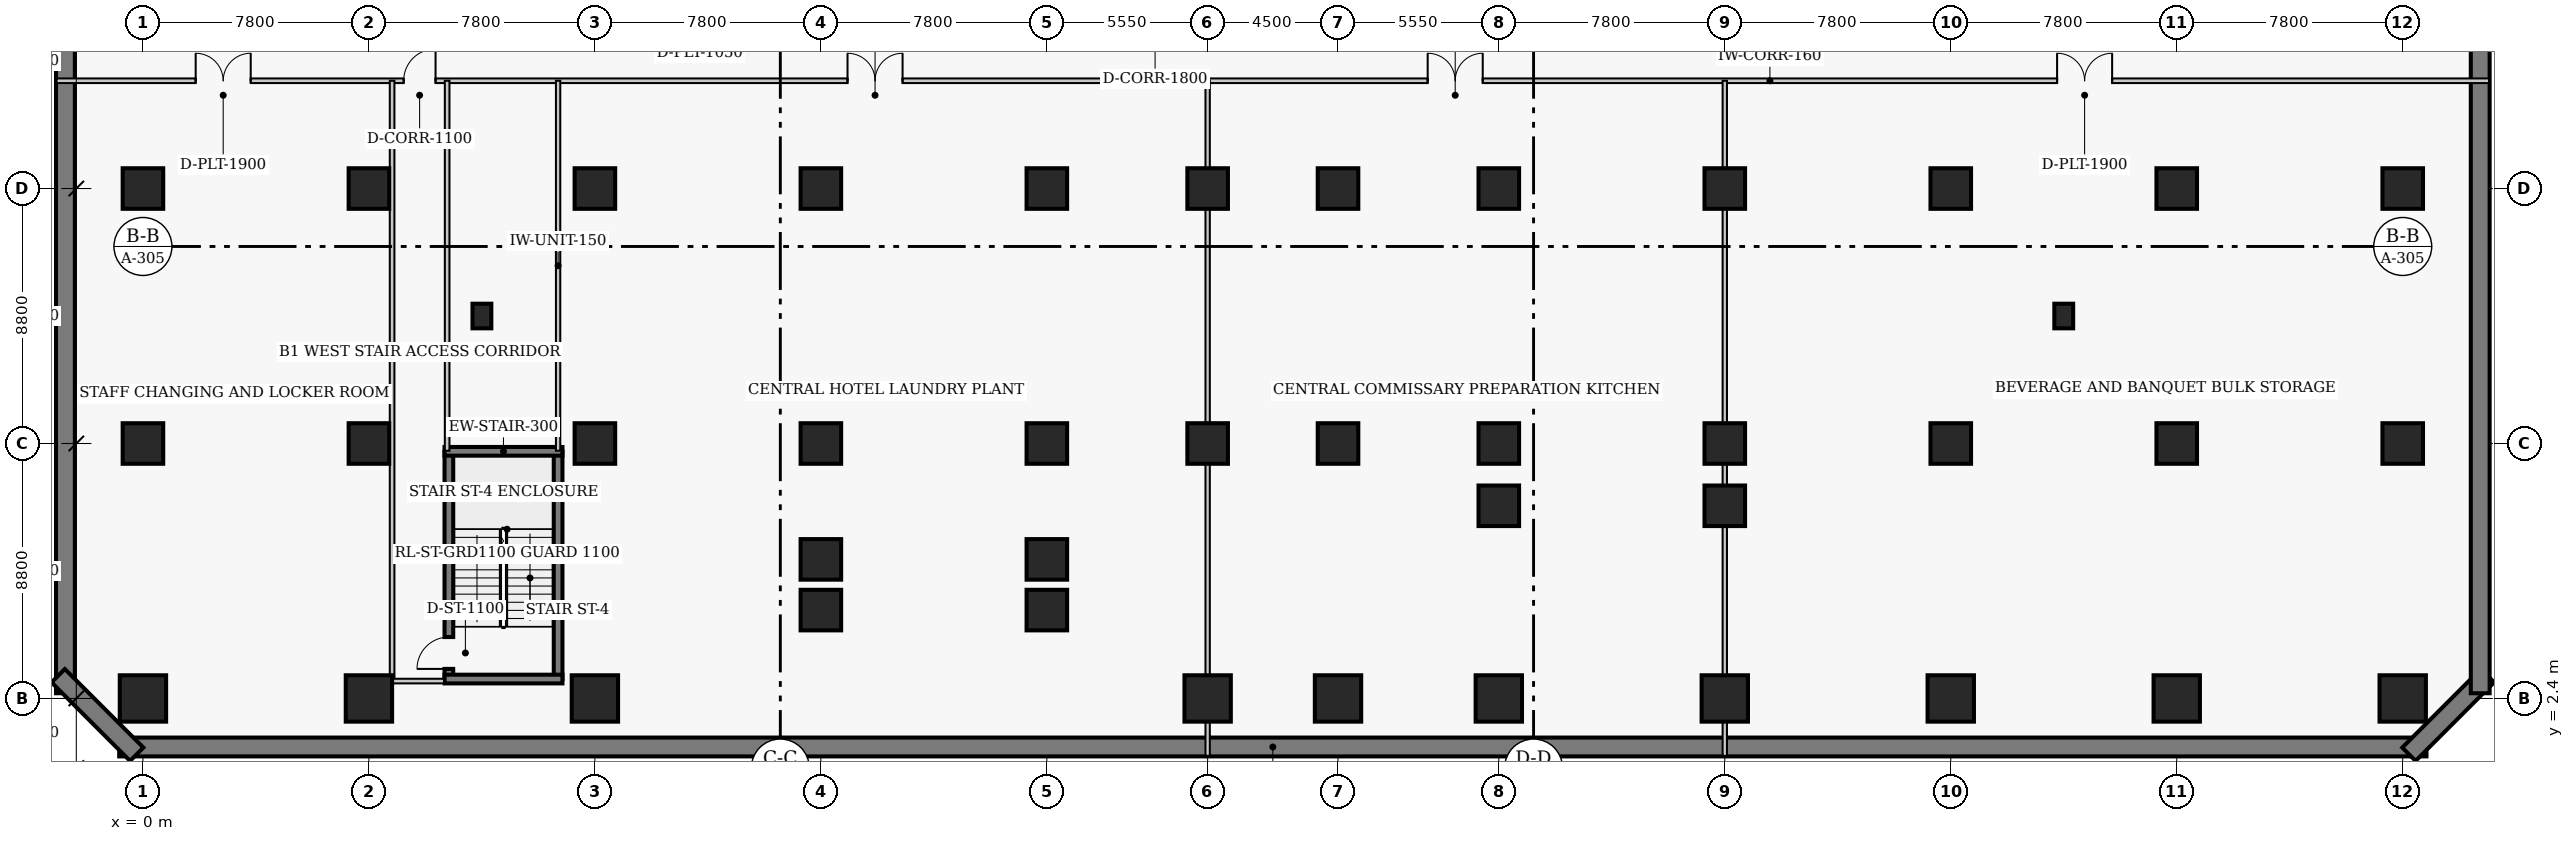
"""IFC4 building model, lengths in metres.
Left out: names, types, materials, properties, quantities, classifications, styles, units other than length and angle.
Written with IfcOpenShell. Run it as: python <this file> out.ifc"""

import sys

from ifc_helpers import new_model, si_unit, direction, frame, frame_2d, origin, origin_2d, place, context, subcontext, project, spatial, rectangle, extrude, element, fill, save


model = new_model("IFC4")
c1 = context("Model", 3, precision=1e-05, world=origin(), true_north=direction((0.0, 1.0)))
c2 = subcontext(c1, "Body", "Model", "MODEL_VIEW")
j1 = project(units=[si_unit("LENGTHUNIT", "METRE"), si_unit("PLANEANGLEUNIT", "RADIAN")], contexts=[c1])
p1 = place(None, origin())
s1 = spatial("IfcSite", under=j1, at=p1, CompositionType="ELEMENT")
p2 = place(p1, origin())
s2 = spatial("IfcBuilding", under=s1, at=p2, CompositionType="ELEMENT")
p3 = place(p2, frame((0.0, 0.0, -4.5)))
s3 = spatial("IfcBuildingStorey", under=s2, at=p3, CompositionType="ELEMENT", Elevation=-4.5)
p4 = place(p3, frame((-0.82, 0.725, 0.0), z_axis=(0.0, 0.0, 1.0), x_axis=(1.0, 0.0, 0.0)))
e1 = element("IfcWall", 1, at=p4, inside=s3, PredefinedType="USERDEFINED", context=c2, shape_type="SweptSolid", body=[
    extrude(rectangle(XDim=79.64, YDim=0.65, at=frame_2d((39.82, 0.0))), origin(), (0.0, 0.0, 1.0), 4.15),
])
p5 = place(p3, frame((78.215, 0.474, 0.0), z_axis=(0.0, 0.0, 1.0), x_axis=(0.707106781187, 0.707106781187, 0.0)))
e2 = element("IfcWall", 2, at=p5, inside=s3, PredefinedType="USERDEFINED", context=c2, shape_type="SweptSolid", body=[
    extrude(rectangle(XDim=3.834, YDim=0.65, at=frame_2d((1.917, 0.0))), origin(), (0.0, 0.0, 1.0), 4.15),
])
for number, where, z_axis, x_axis in (
    (3, (80.675, 2.58, 0.0), (0.0, 0.0, 1.0), (0.0, 1.0, 0.0)),
    (4, (-2.675, 49.42, 0.0), (0.0, 0.0, 1.0), (0.0, -1.0, 0.0)),
):
    element("IfcWall", number, at=place(p3, frame(where, z_axis=z_axis, x_axis=x_axis)), inside=s3, PredefinedType="USERDEFINED", context=c2, shape_type="SweptSolid", body=[
        extrude(rectangle(XDim=46.84, YDim=0.65, at=frame_2d((23.42, 0.0))), origin(), (0.0, 0.0, 1.0), 4.15),
    ])
p6 = place(p3, frame((-2.926, 3.185, 0.0), z_axis=(0.0, 0.0, 1.0), x_axis=(0.707106781187, -0.707106781187, 0.0)))
e5 = element("IfcWall", 5, at=p6, inside=s3, PredefinedType="USERDEFINED", context=c2, shape_type="SweptSolid", body=[
    extrude(rectangle(XDim=3.834, YDim=0.65, at=frame_2d((1.917, 0.0))), origin(), (0.0, 0.0, 1.0), 4.15),
])
p7 = place(p3, frame((10.56, 3.07, 0.0), z_axis=(0.0, 0.0, 1.0), x_axis=(0.0, 1.0, 0.0)))
e6 = element("IfcWall", 6, at=p7, inside=s3, PredefinedType="SHEAR", context=c2, shape_type="SweptSolid", body=[
    extrude(rectangle(XDim=7.86, YDim=0.3, at=frame_2d((3.93, 0.0))), origin(), (0.0, 0.0, 1.0), 4.5),
])
p8 = place(p7, frame((0.35, 0.0, 0.0)))
e7 = element("IfcOpeningElement", 7, at=p8, cuts=e6, PredefinedType="OPENING", context=c2, shape_type="SweptSolid", body=[
    extrude(rectangle(XDim=1.1, YDim=2.15, at=frame_2d((0.55, 1.075))), frame((0.0, 0.16, 0.0), z_axis=(0.0, -1.0, 0.0), x_axis=(1.0, 0.0, 0.0)), (0.0, 0.0, 1.0), 0.32),
])
p9 = place(p3, frame((14.33, 3.07, 0.0), z_axis=(0.0, 0.0, 1.0), x_axis=(0.0, 1.0, 0.0)))
e8 = element("IfcWall", 8, at=p9, inside=s3, PredefinedType="SHEAR", context=c2, shape_type="SweptSolid", body=[
    extrude(rectangle(XDim=7.86, YDim=0.3, at=frame_2d((3.93, 0.0))), origin(), (0.0, 0.0, 1.0), 4.5),
])
for number, where, z_axis, x_axis in (
    (9, (10.41, 10.93, 0.0), (0.0, 0.0, 1.0), (1.0, 0.0, 0.0)),
    (10, (10.41, 3.07, 0.0), (0.0, 0.0, 1.0), (1.0, 0.0, 0.0)),
):
    element("IfcWall", number, at=place(p3, frame(where, z_axis=z_axis, x_axis=x_axis)), inside=s3, PredefinedType="SHEAR", context=c2, shape_type="SweptSolid", body=[
        extrude(rectangle(XDim=4.07, YDim=0.3, at=frame_2d((2.035, 0.0))), origin(), (0.0, 0.0, 1.0), 4.5),
    ])
p10 = place(p3, frame((0.0, 2.4, 0.0), z_axis=(0.0, 0.0, 1.0), x_axis=(1.0, 0.0, 0.0)))
e11 = element("IfcColumn", 11, at=p10, inside=s3, PredefinedType="COLUMN", context=c2, shape_type="SweptSolid", body=[
    extrude(rectangle(XDim=1.6, YDim=1.6, at=origin_2d()), origin(), (0.0, 0.0, 1.0), 4.5),
])
for number, where, z_axis, x_axis in (
    (12, (0.0, 11.2, 0.0), (0.0, 0.0, 1.0), (1.0, 0.0, 0.0)),
    (13, (0.0, 20.0, 0.0), (0.0, 0.0, 1.0), (1.0, 0.0, 0.0)),
):
    element("IfcColumn", number, at=place(p3, frame(where, z_axis=z_axis, x_axis=x_axis)), inside=s3, PredefinedType="COLUMN", context=c2, shape_type="SweptSolid", body=[
        extrude(rectangle(XDim=1.4, YDim=1.4, at=origin_2d()), origin(), (0.0, 0.0, 1.0), 4.5),
    ])
p11 = place(p3, frame((7.8, 2.4, 0.0), z_axis=(0.0, 0.0, 1.0), x_axis=(1.0, 0.0, 0.0)))
e14 = element("IfcColumn", 14, at=p11, inside=s3, PredefinedType="COLUMN", context=c2, shape_type="SweptSolid", body=[
    extrude(rectangle(XDim=1.6, YDim=1.6, at=origin_2d()), origin(), (0.0, 0.0, 1.0), 4.5),
])
for number, where, z_axis, x_axis in (
    (15, (7.8, 11.2, 0.0), (0.0, 0.0, 1.0), (1.0, 0.0, 0.0)),
    (16, (7.8, 20.0, 0.0), (0.0, 0.0, 1.0), (1.0, 0.0, 0.0)),
):
    element("IfcColumn", number, at=place(p3, frame(where, z_axis=z_axis, x_axis=x_axis)), inside=s3, PredefinedType="COLUMN", context=c2, shape_type="SweptSolid", body=[
        extrude(rectangle(XDim=1.4, YDim=1.4, at=origin_2d()), origin(), (0.0, 0.0, 1.0), 4.5),
    ])
p12 = place(p3, frame((15.6, 2.4, 0.0), z_axis=(0.0, 0.0, 1.0), x_axis=(1.0, 0.0, 0.0)))
e17 = element("IfcColumn", 17, at=p12, inside=s3, PredefinedType="COLUMN", context=c2, shape_type="SweptSolid", body=[
    extrude(rectangle(XDim=1.6, YDim=1.6, at=origin_2d()), origin(), (0.0, 0.0, 1.0), 4.5),
])
for number, where, z_axis, x_axis in (
    (18, (15.6, 11.2, 0.0), (0.0, 0.0, 1.0), (1.0, 0.0, 0.0)),
    (19, (15.6, 20.0, 0.0), (0.0, 0.0, 1.0), (1.0, 0.0, 0.0)),
    (20, (23.4, 11.2, 0.0), (0.0, 0.0, 1.0), (1.0, 0.0, 0.0)),
    (21, (23.4, 20.0, 0.0), (0.0, 0.0, 1.0), (1.0, 0.0, 0.0)),
    (22, (31.2, 11.2, 0.0), (0.0, 0.0, 1.0), (1.0, 0.0, 0.0)),
    (23, (31.2, 20.0, 0.0), (0.0, 0.0, 1.0), (1.0, 0.0, 0.0)),
):
    element("IfcColumn", number, at=place(p3, frame(where, z_axis=z_axis, x_axis=x_axis)), inside=s3, PredefinedType="COLUMN", context=c2, shape_type="SweptSolid", body=[
        extrude(rectangle(XDim=1.4, YDim=1.4, at=origin_2d()), origin(), (0.0, 0.0, 1.0), 4.5),
    ])
p13 = place(p3, frame((36.75, 2.4, 0.0), z_axis=(0.0, 0.0, 1.0), x_axis=(1.0, 0.0, 0.0)))
e24 = element("IfcColumn", 24, at=p13, inside=s3, PredefinedType="COLUMN", context=c2, shape_type="SweptSolid", body=[
    extrude(rectangle(XDim=1.6, YDim=1.6, at=origin_2d()), origin(), (0.0, 0.0, 1.0), 4.5),
])
for number, where, z_axis, x_axis in (
    (25, (36.75, 11.2, 0.0), (0.0, 0.0, 1.0), (1.0, 0.0, 0.0)),
    (26, (36.75, 20.0, 0.0), (0.0, 0.0, 1.0), (1.0, 0.0, 0.0)),
):
    element("IfcColumn", number, at=place(p3, frame(where, z_axis=z_axis, x_axis=x_axis)), inside=s3, PredefinedType="COLUMN", context=c2, shape_type="SweptSolid", body=[
        extrude(rectangle(XDim=1.4, YDim=1.4, at=origin_2d()), origin(), (0.0, 0.0, 1.0), 4.5),
    ])
p14 = place(p3, frame((41.25, 2.4, 0.0), z_axis=(0.0, 0.0, 1.0), x_axis=(1.0, 0.0, 0.0)))
e27 = element("IfcColumn", 27, at=p14, inside=s3, PredefinedType="COLUMN", context=c2, shape_type="SweptSolid", body=[
    extrude(rectangle(XDim=1.6, YDim=1.6, at=origin_2d()), origin(), (0.0, 0.0, 1.0), 4.5),
])
for number, where, z_axis, x_axis in (
    (28, (41.25, 11.2, 0.0), (0.0, 0.0, 1.0), (1.0, 0.0, 0.0)),
    (29, (41.25, 20.0, 0.0), (0.0, 0.0, 1.0), (1.0, 0.0, 0.0)),
):
    element("IfcColumn", number, at=place(p3, frame(where, z_axis=z_axis, x_axis=x_axis)), inside=s3, PredefinedType="COLUMN", context=c2, shape_type="SweptSolid", body=[
        extrude(rectangle(XDim=1.4, YDim=1.4, at=origin_2d()), origin(), (0.0, 0.0, 1.0), 4.5),
    ])
p15 = place(p3, frame((46.8, 2.4, 0.0), z_axis=(0.0, 0.0, 1.0), x_axis=(1.0, 0.0, 0.0)))
e30 = element("IfcColumn", 30, at=p15, inside=s3, PredefinedType="COLUMN", context=c2, shape_type="SweptSolid", body=[
    extrude(rectangle(XDim=1.6, YDim=1.6, at=origin_2d()), origin(), (0.0, 0.0, 1.0), 4.5),
])
for number, where, z_axis, x_axis in (
    (31, (46.8, 11.2, 0.0), (0.0, 0.0, 1.0), (1.0, 0.0, 0.0)),
    (32, (46.8, 20.0, 0.0), (0.0, 0.0, 1.0), (1.0, 0.0, 0.0)),
):
    element("IfcColumn", number, at=place(p3, frame(where, z_axis=z_axis, x_axis=x_axis)), inside=s3, PredefinedType="COLUMN", context=c2, shape_type="SweptSolid", body=[
        extrude(rectangle(XDim=1.4, YDim=1.4, at=origin_2d()), origin(), (0.0, 0.0, 1.0), 4.5),
    ])
p16 = place(p3, frame((54.6, 2.4, 0.0), z_axis=(0.0, 0.0, 1.0), x_axis=(1.0, 0.0, 0.0)))
e33 = element("IfcColumn", 33, at=p16, inside=s3, PredefinedType="COLUMN", context=c2, shape_type="SweptSolid", body=[
    extrude(rectangle(XDim=1.6, YDim=1.6, at=origin_2d()), origin(), (0.0, 0.0, 1.0), 4.5),
])
for number, where, z_axis, x_axis in (
    (34, (54.6, 11.2, 0.0), (0.0, 0.0, 1.0), (1.0, 0.0, 0.0)),
    (35, (54.6, 20.0, 0.0), (0.0, 0.0, 1.0), (1.0, 0.0, 0.0)),
):
    element("IfcColumn", number, at=place(p3, frame(where, z_axis=z_axis, x_axis=x_axis)), inside=s3, PredefinedType="COLUMN", context=c2, shape_type="SweptSolid", body=[
        extrude(rectangle(XDim=1.4, YDim=1.4, at=origin_2d()), origin(), (0.0, 0.0, 1.0), 4.5),
    ])
p17 = place(p3, frame((62.4, 2.4, 0.0), z_axis=(0.0, 0.0, 1.0), x_axis=(1.0, 0.0, 0.0)))
e36 = element("IfcColumn", 36, at=p17, inside=s3, PredefinedType="COLUMN", context=c2, shape_type="SweptSolid", body=[
    extrude(rectangle(XDim=1.6, YDim=1.6, at=origin_2d()), origin(), (0.0, 0.0, 1.0), 4.5),
])
for number, where, z_axis, x_axis in (
    (37, (62.4, 11.2, 0.0), (0.0, 0.0, 1.0), (1.0, 0.0, 0.0)),
    (38, (62.4, 20.0, 0.0), (0.0, 0.0, 1.0), (1.0, 0.0, 0.0)),
):
    element("IfcColumn", number, at=place(p3, frame(where, z_axis=z_axis, x_axis=x_axis)), inside=s3, PredefinedType="COLUMN", context=c2, shape_type="SweptSolid", body=[
        extrude(rectangle(XDim=1.4, YDim=1.4, at=origin_2d()), origin(), (0.0, 0.0, 1.0), 4.5),
    ])
p18 = place(p3, frame((70.2, 2.4, 0.0), z_axis=(0.0, 0.0, 1.0), x_axis=(1.0, 0.0, 0.0)))
e39 = element("IfcColumn", 39, at=p18, inside=s3, PredefinedType="COLUMN", context=c2, shape_type="SweptSolid", body=[
    extrude(rectangle(XDim=1.6, YDim=1.6, at=origin_2d()), origin(), (0.0, 0.0, 1.0), 4.5),
])
for number, where, z_axis, x_axis in (
    (40, (70.2, 11.2, 0.0), (0.0, 0.0, 1.0), (1.0, 0.0, 0.0)),
    (41, (70.2, 20.0, 0.0), (0.0, 0.0, 1.0), (1.0, 0.0, 0.0)),
):
    element("IfcColumn", number, at=place(p3, frame(where, z_axis=z_axis, x_axis=x_axis)), inside=s3, PredefinedType="COLUMN", context=c2, shape_type="SweptSolid", body=[
        extrude(rectangle(XDim=1.4, YDim=1.4, at=origin_2d()), origin(), (0.0, 0.0, 1.0), 4.5),
    ])
p19 = place(p3, frame((78.0, 2.4, 0.0), z_axis=(0.0, 0.0, 1.0), x_axis=(1.0, 0.0, 0.0)))
e42 = element("IfcColumn", 42, at=p19, inside=s3, PredefinedType="COLUMN", context=c2, shape_type="SweptSolid", body=[
    extrude(rectangle(XDim=1.6, YDim=1.6, at=origin_2d()), origin(), (0.0, 0.0, 1.0), 4.5),
])
for number, where, z_axis, x_axis in (
    (43, (78.0, 11.2, 0.0), (0.0, 0.0, 1.0), (1.0, 0.0, 0.0)),
    (44, (78.0, 20.0, 0.0), (0.0, 0.0, 1.0), (1.0, 0.0, 0.0)),
    (45, (23.4, 7.2, 0.0), (0.0, 0.0, 1.0), (1.0, 0.0, 0.0)),
    (46, (31.2, 7.2, 0.0), (0.0, 0.0, 1.0), (1.0, 0.0, 0.0)),
    (47, (23.4, 5.45, 0.0), (0.0, 0.0, 1.0), (1.0, 0.0, 0.0)),
    (48, (31.2, 5.45, 0.0), (0.0, 0.0, 1.0), (1.0, 0.0, 0.0)),
    (49, (46.8, 9.05, 0.0), (0.0, 0.0, 1.0), (1.0, 0.0, 0.0)),
    (50, (54.6, 9.05, 0.0), (0.0, 0.0, 1.0), (1.0, 0.0, 0.0)),
):
    element("IfcColumn", number, at=place(p3, frame(where, z_axis=z_axis, x_axis=x_axis)), inside=s3, PredefinedType="COLUMN", context=c2, shape_type="SweptSolid", body=[
        extrude(rectangle(XDim=1.4, YDim=1.4, at=origin_2d()), origin(), (0.0, 0.0, 1.0), 4.5),
    ])
for number, where, z_axis, x_axis in (
    (51, (11.7, 15.6, 0.0), (0.0, 0.0, 1.0), (1.0, 0.0, 0.0)),
    (52, (66.3, 15.6, 0.0), (0.0, 0.0, 1.0), (1.0, 0.0, 0.0)),
):
    element("IfcColumn", number, at=place(p3, frame(where, z_axis=z_axis, x_axis=x_axis)), inside=s3, PredefinedType="PILASTER", context=c2, shape_type="SweptSolid", body=[
        extrude(rectangle(XDim=0.65, YDim=0.85, at=origin_2d()), origin(), (0.0, 0.0, 1.0), 4.5),
    ])
p20 = place(p3, frame((-2.98, 23.72, 0.0), z_axis=(0.0, 0.0, 1.0), x_axis=(1.0, 0.0, 0.0)))
e53 = element("IfcWall", 53, at=p20, inside=s3, PredefinedType="PARTITIONING", context=c2, shape_type="SweptSolid", body=[
    extrude(rectangle(XDim=83.96, YDim=0.16, at=frame_2d((41.98, 0.0))), origin(), (0.0, 0.0, 1.0), 4.15),
])
p21 = place(p20, frame((11.98, 0.0, 0.0)))
e54 = element("IfcOpeningElement", 54, at=p21, cuts=e53, PredefinedType="OPENING", context=c2, shape_type="SweptSolid", body=[
    extrude(rectangle(XDim=1.1, YDim=2.15, at=frame_2d((0.55, 1.075))), frame((0.0, 0.09, 0.0), z_axis=(0.0, -1.0, 0.0), x_axis=(1.0, 0.0, 0.0)), (0.0, 0.0, 1.0), 0.18),
])
p22 = place(p20, frame((4.8, 0.0, 0.0)))
e55 = element("IfcOpeningElement", 55, at=p22, cuts=e53, PredefinedType="OPENING", context=c2, shape_type="SweptSolid", body=[
    extrude(rectangle(XDim=1.9, YDim=2.25, at=frame_2d((0.95, 1.125))), frame((0.0, 0.09, 0.0), z_axis=(0.0, -1.0, 0.0), x_axis=(1.0, 0.0, 0.0)), (0.0, 0.0, 1.0), 0.18),
])
p23 = place(p20, frame((27.3, 0.0, 0.0)))
e56 = element("IfcOpeningElement", 56, at=p23, cuts=e53, PredefinedType="OPENING", context=c2, shape_type="SweptSolid", body=[
    extrude(rectangle(XDim=1.9, YDim=2.25, at=frame_2d((0.95, 1.125))), frame((0.0, 0.09, 0.0), z_axis=(0.0, -1.0, 0.0), x_axis=(1.0, 0.0, 0.0)), (0.0, 0.0, 1.0), 0.18),
])
p24 = place(p20, frame((47.325, 0.0, 0.0)))
e57 = element("IfcOpeningElement", 57, at=p24, cuts=e53, PredefinedType="OPENING", context=c2, shape_type="SweptSolid", body=[
    extrude(rectangle(XDim=1.9, YDim=2.25, at=frame_2d((0.95, 1.125))), frame((0.0, 0.09, 0.0), z_axis=(0.0, -1.0, 0.0), x_axis=(1.0, 0.0, 0.0)), (0.0, 0.0, 1.0), 0.18),
])
p25 = place(p20, frame((69.05, 0.0, 0.0)))
e58 = element("IfcOpeningElement", 58, at=p25, cuts=e53, PredefinedType="OPENING", context=c2, shape_type="SweptSolid", body=[
    extrude(rectangle(XDim=1.9, YDim=2.25, at=frame_2d((0.95, 1.125))), frame((0.0, 0.09, 0.0), z_axis=(0.0, -1.0, 0.0), x_axis=(1.0, 0.0, 0.0)), (0.0, 0.0, 1.0), 0.18),
])
p26 = place(p3, frame((8.6, 3.0, 0.0), z_axis=(0.0, 0.0, 1.0), x_axis=(0.0, 1.0, 0.0)))
e59 = element("IfcWall", 59, at=p26, inside=s3, PredefinedType="PARTITIONING", context=c2, shape_type="SweptSolid", body=[
    extrude(rectangle(XDim=20.72, YDim=0.16, at=frame_2d((10.36, 0.0))), origin(), (0.0, 0.0, 1.0), 4.15),
])
p27 = place(p3, frame((10.5, 10.95, 0.0), z_axis=(0.0, 0.0, 1.0), x_axis=(0.0, 1.0, 0.0)))
e60 = element("IfcWall", 60, at=p27, inside=s3, PredefinedType="PARTITIONING", context=c2, shape_type="SweptSolid", body=[
    extrude(rectangle(XDim=12.77, YDim=0.16, at=frame_2d((6.385, 0.0))), origin(), (0.0, 0.0, 1.0), 4.15),
])
p28 = place(p3, frame((8.6, 3.0, 0.0), z_axis=(0.0, 0.0, 1.0), x_axis=(1.0, 0.0, 0.0)))
e61 = element("IfcWall", 61, at=p28, inside=s3, PredefinedType="PARTITIONING", context=c2, shape_type="SweptSolid", body=[
    extrude(rectangle(XDim=1.79, YDim=0.16, at=frame_2d((0.895, 0.0))), origin(), (0.0, 0.0, 1.0), 4.15),
])
p29 = place(p3, frame((14.33, 10.95, 0.0), z_axis=(0.0, 0.0, 1.0), x_axis=(0.0, 1.0, 0.0)))
e62 = element("IfcWall", 62, at=p29, inside=s3, PredefinedType="PARTITIONING", context=c2, shape_type="SweptSolid", body=[
    extrude(rectangle(XDim=12.77, YDim=0.15, at=frame_2d((6.385, 0.0))), origin(), (0.0, 0.0, 1.0), 4.15),
])
for number, where, z_axis, x_axis in (
    (63, (36.75, 0.42, 0.0), (0.0, 0.0, 1.0), (0.0, 1.0, 0.0)),
    (64, (54.6, 0.42, 0.0), (0.0, 0.0, 1.0), (0.0, 1.0, 0.0)),
):
    element("IfcWall", number, at=place(p3, frame(where, z_axis=z_axis, x_axis=x_axis)), inside=s3, PredefinedType="PARTITIONING", context=c2, shape_type="SweptSolid", body=[
        extrude(rectangle(XDim=23.3, YDim=0.15, at=frame_2d((11.65, 0.0))), origin(), (0.0, 0.0, 1.0), 3.11),
    ])
p30 = place(p21, origin())
e65 = element("IfcDoor", 65, at=p30, inside=s3, OperationType="SINGLE_SWING_RIGHT", PredefinedType="DOOR", context=c2, shape_type="SweptSolid", body=[
    extrude(rectangle(XDim=1.1, YDim=2.15, at=frame_2d((0.55, 1.075))), frame((0.0, 0.025, 0.0), z_axis=(0.0, -1.0, 0.0), x_axis=(1.0, 0.0, 0.0)), (0.0, 0.0, 1.0), 0.05),
])
fill(e54, e65)
p31 = place(p22, origin())
e66 = element("IfcDoor", 66, at=p31, inside=s3, OperationType="DOUBLE_DOOR_SINGLE_SWING", PredefinedType="DOOR", context=c2, shape_type="SweptSolid", body=[
    extrude(rectangle(XDim=1.9, YDim=2.25, at=frame_2d((0.95, 1.125))), frame((0.0, 0.025, 0.0), z_axis=(0.0, -1.0, 0.0), x_axis=(1.0, 0.0, 0.0)), (0.0, 0.0, 1.0), 0.05),
])
fill(e55, e66)
p32 = place(p23, origin())
e67 = element("IfcDoor", 67, at=p32, inside=s3, OperationType="DOUBLE_DOOR_SINGLE_SWING", PredefinedType="DOOR", context=c2, shape_type="SweptSolid", body=[
    extrude(rectangle(XDim=1.9, YDim=2.25, at=frame_2d((0.95, 1.125))), frame((0.0, 0.025, 0.0), z_axis=(0.0, -1.0, 0.0), x_axis=(1.0, 0.0, 0.0)), (0.0, 0.0, 1.0), 0.05),
])
fill(e56, e67)
p33 = place(p24, origin())
e68 = element("IfcDoor", 68, at=p33, inside=s3, OperationType="DOUBLE_DOOR_SINGLE_SWING", PredefinedType="DOOR", context=c2, shape_type="SweptSolid", body=[
    extrude(rectangle(XDim=1.9, YDim=2.25, at=frame_2d((0.95, 1.125))), frame((0.0, 0.025, 0.0), z_axis=(0.0, -1.0, 0.0), x_axis=(1.0, 0.0, 0.0)), (0.0, 0.0, 1.0), 0.05),
])
fill(e57, e68)
p34 = place(p25, origin())
e69 = element("IfcDoor", 69, at=p34, inside=s3, OperationType="DOUBLE_DOOR_SINGLE_SWING", PredefinedType="DOOR", context=c2, shape_type="SweptSolid", body=[
    extrude(rectangle(XDim=1.9, YDim=2.25, at=frame_2d((0.95, 1.125))), frame((0.0, 0.025, 0.0), z_axis=(0.0, -1.0, 0.0), x_axis=(1.0, 0.0, 0.0)), (0.0, 0.0, 1.0), 0.05),
])
fill(e58, e69)
p35 = place(p8, origin())
e70 = element("IfcDoor", 70, at=p35, inside=s3, OperationType="SINGLE_SWING_LEFT", PredefinedType="DOOR", context=c2, shape_type="SweptSolid", body=[
    extrude(rectangle(XDim=1.1, YDim=2.15, at=frame_2d((0.55, 1.075))), frame((0.0, 0.025, 0.0), z_axis=(0.0, -1.0, 0.0), x_axis=(1.0, 0.0, 0.0)), (0.0, 0.0, 1.0), 0.05),
])
fill(e7, e70)
save(model, sys.argv[1])
